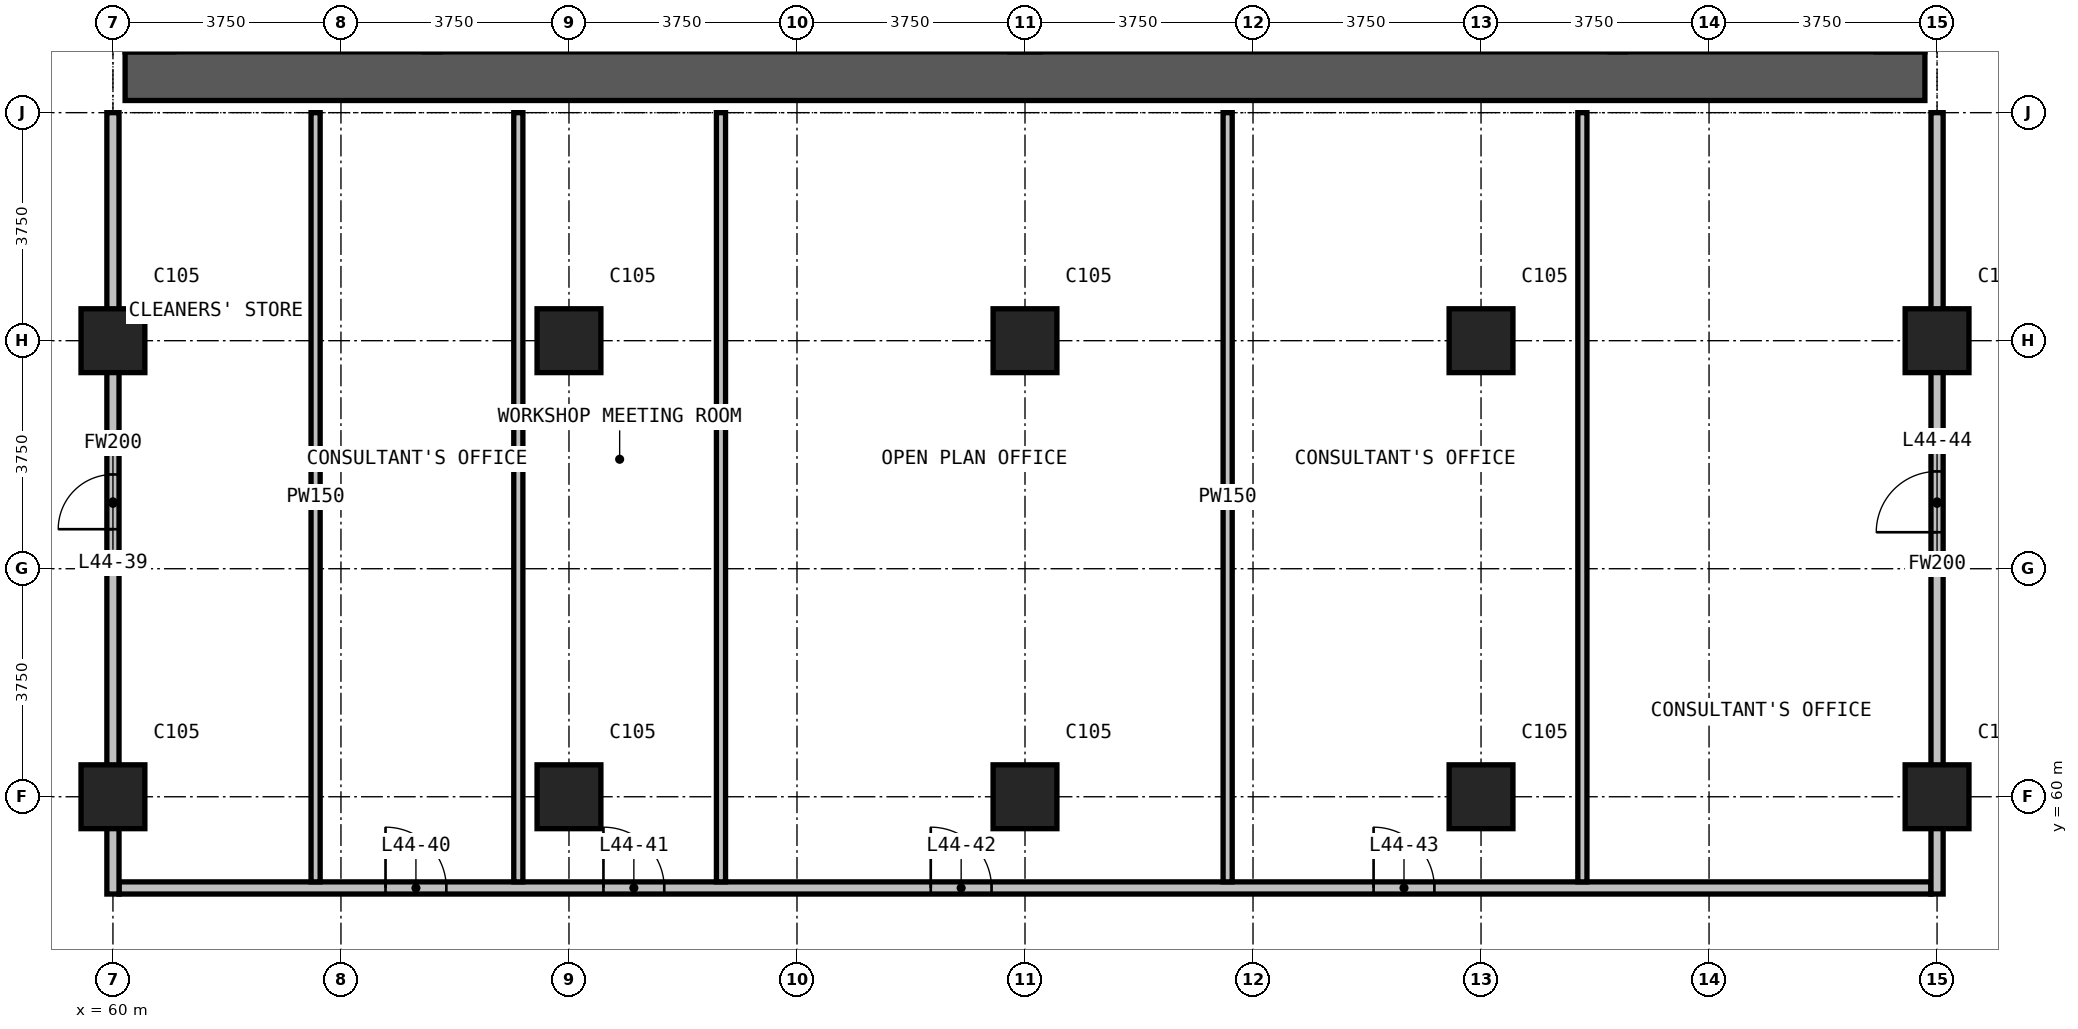
"""IFC4 building model, lengths in metres.
Left out: names, types, materials, properties, quantities, classifications, styles, units other than length and angle.
Written with IfcOpenShell. Run it as: python <this file> out.ifc"""

import sys

from ifc_helpers import new_model, si_unit, direction, frame, frame_2d, origin, origin_2d, place, context, subcontext, project, spatial, rectangle, extrude, element, fill, save


model = new_model("IFC4")
c1 = context("Model", 3, precision=1e-05, world=origin(), true_north=direction((0.0, 1.0)))
c2 = subcontext(c1, "Body", "Model", "MODEL_VIEW")
j1 = project(units=[si_unit("LENGTHUNIT", "METRE"), si_unit("PLANEANGLEUNIT", "RADIAN")], contexts=[c1])
p1 = place(None, origin())
s1 = spatial("IfcSite", under=j1, at=p1, CompositionType="ELEMENT")
p2 = place(p1, origin())
s2 = spatial("IfcBuilding", under=s1, at=p2, CompositionType="ELEMENT")
p3 = place(p2, frame((0.0, 0.0, 172.9)))
s3 = spatial("IfcBuildingStorey", under=s2, at=p3, CompositionType="ELEMENT", Elevation=172.9)
for number, where, z_axis, x_axis in (
    (1, (60.0, 60.0, 0.0), (0.0, 0.0, 1.0), (1.0, 0.0, 0.0)),
    (2, (60.0, 67.5, 0.0), (0.0, 0.0, 1.0), (1.0, 0.0, 0.0)),
    (3, (67.5, 60.0, 0.0), (0.0, 0.0, 1.0), (1.0, 0.0, 0.0)),
    (4, (67.5, 67.5, 0.0), (0.0, 0.0, 1.0), (1.0, 0.0, 0.0)),
    (5, (75.0, 60.0, 0.0), (0.0, 0.0, 1.0), (1.0, 0.0, 0.0)),
    (6, (75.0, 67.5, 0.0), (0.0, 0.0, 1.0), (1.0, 0.0, 0.0)),
    (7, (82.5, 60.0, 0.0), (0.0, 0.0, 1.0), (1.0, 0.0, 0.0)),
    (8, (82.5, 67.5, 0.0), (0.0, 0.0, 1.0), (1.0, 0.0, 0.0)),
    (9, (90.0, 60.0, 0.0), (0.0, 0.0, 1.0), (1.0, 0.0, 0.0)),
    (10, (90.0, 67.5, 0.0), (0.0, 0.0, 1.0), (1.0, 0.0, 0.0)),
):
    element("IfcColumn", number, at=place(p3, frame(where, z_axis=z_axis, x_axis=x_axis)), inside=s3, PredefinedType="COLUMN", context=c2, shape_type="SweptSolid", body=[
        extrude(rectangle(XDim=1.05, YDim=1.05, at=origin_2d()), origin(), (0.0, 0.0, 1.0), 3.6),
    ])
p4 = place(p3, frame((60.2, 71.85, 0.0), z_axis=(0.0, 0.0, 1.0), x_axis=(1.0, 0.0, 0.0)))
e11 = element("IfcWall", 11, at=p4, inside=s3, PredefinedType="SHEAR", context=c2, shape_type="SweptSolid", body=[
    extrude(rectangle(XDim=29.6, YDim=0.8, at=frame_2d((14.8, 0.0))), origin(), (0.0, 0.0, 1.0), 3.6),
])
p5 = place(p3, frame((60.1, 58.5, 0.0), z_axis=(0.0, 0.0, 1.0), x_axis=(1.0, 0.0, 0.0)))
e12 = element("IfcWall", 12, at=p5, inside=s3, PredefinedType="PARTITIONING", context=c2, shape_type="SweptSolid", body=[
    extrude(rectangle(XDim=29.8, YDim=0.2, at=frame_2d((14.9, 0.0))), origin(), (0.0, 0.0, 1.0), 3.3),
])
p6 = place(p5, frame((4.383, 0.0, 0.0)))
e13 = element("IfcOpeningElement", 13, at=p6, cuts=e12, PredefinedType="OPENING", context=c2, shape_type="SweptSolid", body=[
    extrude(rectangle(XDim=1.0, YDim=2.2, at=frame_2d((0.5, 1.1))), frame((0.0, 0.11, 0.0), z_axis=(0.0, -1.0, 0.0), x_axis=(1.0, 0.0, 0.0)), (0.0, 0.0, 1.0), 0.22),
])
p7 = place(p5, frame((7.967, 0.0, 0.0)))
e14 = element("IfcOpeningElement", 14, at=p7, cuts=e12, PredefinedType="OPENING", context=c2, shape_type="SweptSolid", body=[
    extrude(rectangle(XDim=1.0, YDim=2.2, at=frame_2d((0.5, 1.1))), frame((0.0, 0.11, 0.0), z_axis=(0.0, -1.0, 0.0), x_axis=(1.0, 0.0, 0.0)), (0.0, 0.0, 1.0), 0.22),
])
p8 = place(p5, frame((13.35, 0.0, 0.0)))
e15 = element("IfcOpeningElement", 15, at=p8, cuts=e12, PredefinedType="OPENING", context=c2, shape_type="SweptSolid", body=[
    extrude(rectangle(XDim=1.0, YDim=2.2, at=frame_2d((0.5, 1.1))), frame((0.0, 0.11, 0.0), z_axis=(0.0, -1.0, 0.0), x_axis=(1.0, 0.0, 0.0)), (0.0, 0.0, 1.0), 0.22),
])
p9 = place(p5, frame((20.633, 0.0, 0.0)))
e16 = element("IfcOpeningElement", 16, at=p9, cuts=e12, PredefinedType="OPENING", context=c2, shape_type="SweptSolid", body=[
    extrude(rectangle(XDim=1.0, YDim=2.2, at=frame_2d((0.5, 1.1))), frame((0.0, 0.11, 0.0), z_axis=(0.0, -1.0, 0.0), x_axis=(1.0, 0.0, 0.0)), (0.0, 0.0, 1.0), 0.22),
])
p10 = place(p3, frame((60.0, 58.4, 0.0), z_axis=(0.0, 0.0, 1.0), x_axis=(0.0, 1.0, 0.0)))
e17 = element("IfcWall", 17, at=p10, inside=s3, PredefinedType="PARTITIONING", context=c2, shape_type="SweptSolid", body=[
    extrude(rectangle(XDim=12.85, YDim=0.2, at=frame_2d((6.425, 0.0))), origin(), (0.0, 0.0, 1.0), 3.3),
])
p11 = place(p10, frame((6.0, 0.0, 0.0)))
e18 = element("IfcOpeningElement", 18, at=p11, cuts=e17, PredefinedType="OPENING", context=c2, shape_type="SweptSolid", body=[
    extrude(rectangle(XDim=0.9, YDim=2.2, at=frame_2d((0.45, 1.1))), frame((0.0, 0.11, 0.0), z_axis=(0.0, -1.0, 0.0), x_axis=(1.0, 0.0, 0.0)), (0.0, 0.0, 1.0), 0.22),
])
p12 = place(p3, frame((90.0, 58.4, 0.0), z_axis=(0.0, 0.0, 1.0), x_axis=(0.0, 1.0, 0.0)))
e19 = element("IfcWall", 19, at=p12, inside=s3, PredefinedType="PARTITIONING", context=c2, shape_type="SweptSolid", body=[
    extrude(rectangle(XDim=12.85, YDim=0.2, at=frame_2d((6.425, 0.0))), origin(), (0.0, 0.0, 1.0), 3.3),
])
p13 = place(p12, frame((5.95, 0.0, 0.0)))
e20 = element("IfcOpeningElement", 20, at=p13, cuts=e19, PredefinedType="OPENING", context=c2, shape_type="SweptSolid", body=[
    extrude(rectangle(XDim=1.0, YDim=2.2, at=frame_2d((0.5, 1.1))), frame((0.0, 0.11, 0.0), z_axis=(0.0, -1.0, 0.0), x_axis=(1.0, 0.0, 0.0)), (0.0, 0.0, 1.0), 0.22),
])
for number, where, z_axis, x_axis in (
    (21, (63.333, 58.6, 0.0), (0.0, 0.0, 1.0), (0.0, 1.0, 0.0)),
    (22, (66.667, 58.6, 0.0), (0.0, 0.0, 1.0), (0.0, 1.0, 0.0)),
    (23, (70.0, 58.6, 0.0), (0.0, 0.0, 1.0), (0.0, 1.0, 0.0)),
    (24, (78.333, 58.6, 0.0), (0.0, 0.0, 1.0), (0.0, 1.0, 0.0)),
    (25, (84.167, 58.6, 0.0), (0.0, 0.0, 1.0), (0.0, 1.0, 0.0)),
):
    element("IfcWall", number, at=place(p3, frame(where, z_axis=z_axis, x_axis=x_axis)), inside=s3, PredefinedType="PARTITIONING", context=c2, shape_type="SweptSolid", body=[
        extrude(rectangle(XDim=12.65, YDim=0.15, at=frame_2d((6.325, 0.0))), origin(), (0.0, 0.0, 1.0), 3.3),
    ])
p14 = place(p11, origin())
e26 = element("IfcDoor", 26, at=p14, inside=s3, OperationType="SINGLE_SWING_LEFT", PredefinedType="DOOR", context=c2, shape_type="SweptSolid", body=[
    extrude(rectangle(XDim=0.9, YDim=2.2, at=frame_2d((0.45, 1.1))), frame((0.0, 0.025, 0.0), z_axis=(0.0, -1.0, 0.0), x_axis=(1.0, 0.0, 0.0)), (0.0, 0.0, 1.0), 0.05),
])
fill(e18, e26)
p15 = place(p6, origin())
e27 = element("IfcDoor", 27, at=p15, inside=s3, OperationType="SINGLE_SWING_LEFT", PredefinedType="DOOR", context=c2, shape_type="SweptSolid", body=[
    extrude(rectangle(XDim=1.0, YDim=2.2, at=frame_2d((0.5, 1.1))), frame((0.0, 0.025, 0.0), z_axis=(0.0, -1.0, 0.0), x_axis=(1.0, 0.0, 0.0)), (0.0, 0.0, 1.0), 0.05),
])
fill(e13, e27)
p16 = place(p7, origin())
e28 = element("IfcDoor", 28, at=p16, inside=s3, OperationType="SINGLE_SWING_LEFT", PredefinedType="DOOR", context=c2, shape_type="SweptSolid", body=[
    extrude(rectangle(XDim=1.0, YDim=2.2, at=frame_2d((0.5, 1.1))), frame((0.0, 0.025, 0.0), z_axis=(0.0, -1.0, 0.0), x_axis=(1.0, 0.0, 0.0)), (0.0, 0.0, 1.0), 0.05),
])
fill(e14, e28)
p17 = place(p8, origin())
e29 = element("IfcDoor", 29, at=p17, inside=s3, OperationType="SINGLE_SWING_RIGHT", PredefinedType="DOOR", context=c2, shape_type="SweptSolid", body=[
    extrude(rectangle(XDim=1.0, YDim=2.2, at=frame_2d((0.5, 1.1))), frame((0.0, 0.025, 0.0), z_axis=(0.0, -1.0, 0.0), x_axis=(1.0, 0.0, 0.0)), (0.0, 0.0, 1.0), 0.05),
])
fill(e15, e29)
p18 = place(p9, origin())
e30 = element("IfcDoor", 30, at=p18, inside=s3, OperationType="SINGLE_SWING_LEFT", PredefinedType="DOOR", context=c2, shape_type="SweptSolid", body=[
    extrude(rectangle(XDim=1.0, YDim=2.2, at=frame_2d((0.5, 1.1))), frame((0.0, 0.025, 0.0), z_axis=(0.0, -1.0, 0.0), x_axis=(1.0, 0.0, 0.0)), (0.0, 0.0, 1.0), 0.05),
])
fill(e16, e30)
p19 = place(p13, origin())
e31 = element("IfcDoor", 31, at=p19, inside=s3, OperationType="SINGLE_SWING_LEFT", PredefinedType="DOOR", context=c2, shape_type="SweptSolid", body=[
    extrude(rectangle(XDim=1.0, YDim=2.2, at=frame_2d((0.5, 1.1))), frame((0.0, 0.025, 0.0), z_axis=(0.0, -1.0, 0.0), x_axis=(1.0, 0.0, 0.0)), (0.0, 0.0, 1.0), 0.05),
])
fill(e20, e31)
save(model, sys.argv[1])
